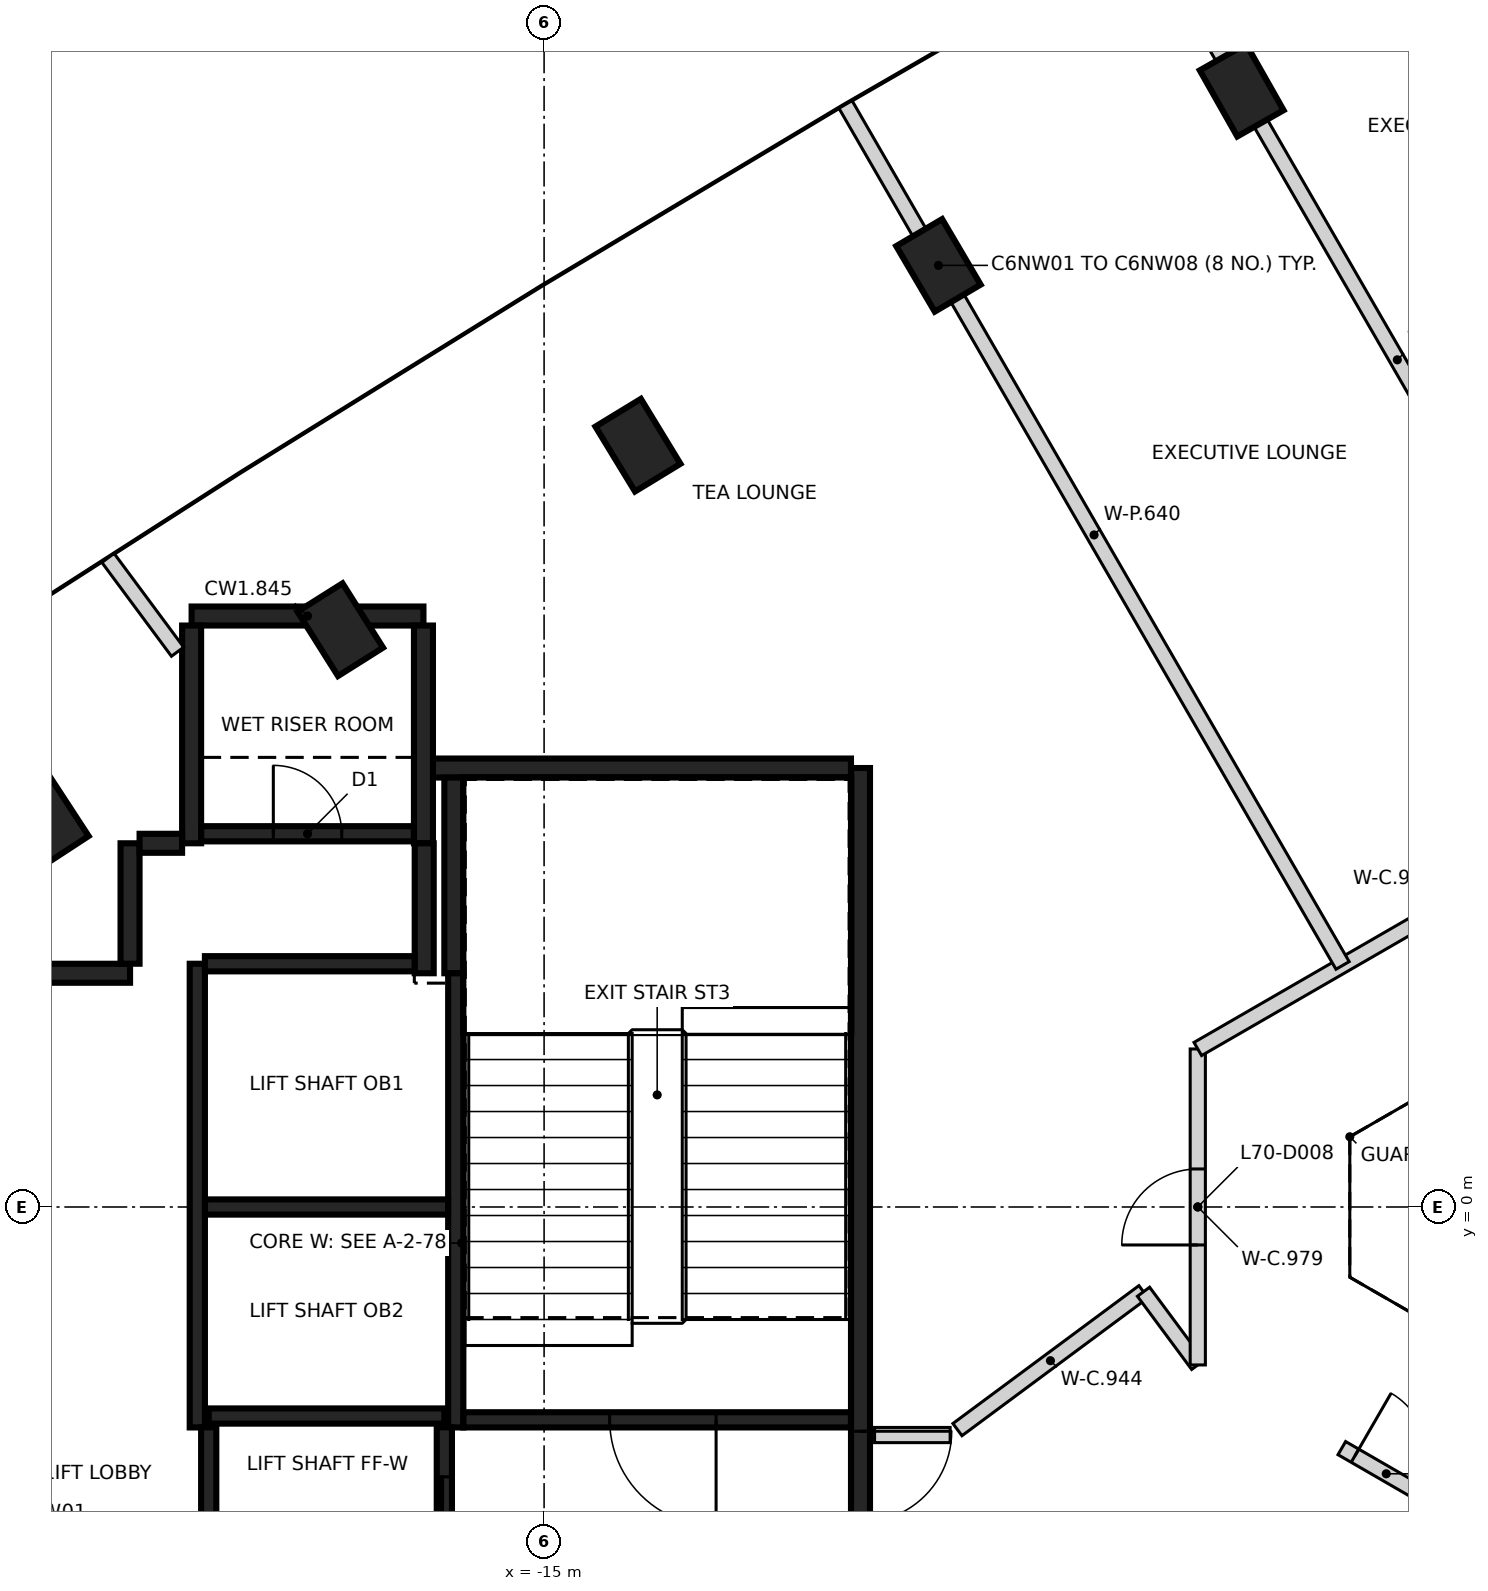
"""IFC4 building model, lengths in metres.
Left out: names, types, materials, properties, quantities, classifications, styles, units other than length and angle.
Written with IfcOpenShell. Run it as: python <this file> out.ifc"""

import sys

from ifc_helpers import new_model, si_unit, direction, frame, frame_2d, origin, origin_2d, place, context, subcontext, project, spatial, rectangle, extrude, element, fill, save


model = new_model("IFC4")
c1 = context("Model", 3, precision=1e-05, world=origin(), true_north=direction((0.0, 1.0)))
c2 = subcontext(c1, "Body", "Model", "MODEL_VIEW")
j1 = project(units=[si_unit("LENGTHUNIT", "METRE"), si_unit("PLANEANGLEUNIT", "RADIAN")], contexts=[c1])
p1 = place(None, origin())
s1 = spatial("IfcSite", under=j1, at=p1, CompositionType="ELEMENT")
p2 = place(p1, origin())
s2 = spatial("IfcBuilding", under=s1, at=p2, CompositionType="ELEMENT")
p3 = place(p2, frame((0.0, 0.0, 276.6)))
s3 = spatial("IfcBuildingStorey", under=s2, at=p3, CompositionType="ELEMENT", Elevation=276.6)
for number, where, z_axis, x_axis in (
    (1, (-5.822, 14.691, -0.35), (0.0, 0.0, 1.0), (-0.493, 0.87, 0.0)),
    (2, (-9.812, 12.388, -0.35), (0.0, 0.0, 1.0), (-0.507, 0.862, 0.0)),
    (3, (-13.765, 10.022, -0.35), (0.0, 0.0, 1.0), (-0.52, 0.854, 0.0)),
    (4, (-17.681, 7.595, -0.35), (0.0, 0.0, 1.0), (-0.533, 0.846, 0.0)),
    (5, (-21.559, 5.107, -0.35), (0.0, 0.0, 1.0), (-0.547, 0.837, 0.0)),
):
    element("IfcColumn", number, at=place(p3, frame(where, z_axis=z_axis, x_axis=x_axis)), inside=s3, PredefinedType="COLUMN", context=c2, shape_type="SweptSolid", body=[
        extrude(rectangle(XDim=1.0, YDim=0.7, at=origin_2d()), origin(), (0.0, 0.0, 1.0), 3.6),
    ])
p4 = place(p3, frame((-10.837, 5.775, 0.0), z_axis=(0.0, 0.0, 1.0), x_axis=(0.0, -1.0, 0.0)))
e6 = element("IfcWall", 6, at=p4, inside=s3, PredefinedType="SHEAR", context=c2, shape_type="SweptSolid", body=[
    extrude(rectangle(XDim=11.55, YDim=0.25, at=frame_2d((5.775, 0.0))), origin(), (0.0, 0.0, 1.0), 3.25),
])
p5 = place(p4, frame((10.025, 0.0, 0.0)))
e7 = element("IfcOpeningElement", 7, at=p5, cuts=e6, PredefinedType="OPENING", context=c2, shape_type="SweptSolid", body=[
    extrude(rectangle(XDim=1.2, YDim=2.1, at=frame_2d((0.6, 1.05))), frame((0.0, 0.135, 0.0), z_axis=(0.0, -1.0, 0.0), x_axis=(1.0, 0.0, 0.0)), (0.0, 0.0, 1.0), 0.27),
])
p6 = place(p4, frame((8.725, 0.0, 0.0)))
e8 = element("IfcOpeningElement", 8, at=p6, cuts=e6, PredefinedType="OPENING", context=c2, shape_type="SweptSolid", body=[
    extrude(rectangle(XDim=1.2, YDim=2.1, at=frame_2d((0.6, 1.05))), frame((0.0, 0.135, 0.0), z_axis=(0.0, -1.0, 0.0), x_axis=(1.0, 0.0, 0.0)), (0.0, 0.0, 1.0), 0.27),
])
p7 = place(p3, frame((-16.472, 5.775, 0.0), z_axis=(0.0, 0.0, 1.0), x_axis=(1.0, 0.0, 0.0)))
e9 = element("IfcWall", 9, at=p7, inside=s3, PredefinedType="SHEAR", context=c2, shape_type="SweptSolid", body=[
    extrude(rectangle(XDim=5.51, YDim=0.25, at=frame_2d((2.755, 0.0))), origin(), (0.0, 0.0, 1.0), 3.25),
])
p8 = place(p3, frame((-19.637, 7.775, 0.0), z_axis=(0.0, 0.0, 1.0), x_axis=(1.0, 0.0, 0.0)))
e10 = element("IfcWall", 10, at=p8, inside=s3, PredefinedType="SHEAR", context=c2, shape_type="SweptSolid", body=[
    extrude(rectangle(XDim=3.05, YDim=0.25, at=frame_2d((1.525, 0.0))), origin(), (0.0, 0.0, 1.0), 3.25),
])
for number, where, z_axis, x_axis in (
    (11, (-16.587, 7.65, 0.0), (0.0, 0.0, 1.0), (0.0, -1.0, 0.0)),
    (12, (-19.637, 4.785, 0.0), (0.0, 0.0, 1.0), (0.0, 1.0, 0.0)),
):
    element("IfcWall", number, at=place(p3, frame(where, z_axis=z_axis, x_axis=x_axis)), inside=s3, PredefinedType="SHEAR", context=c2, shape_type="SweptSolid", body=[
        extrude(rectangle(XDim=2.865, YDim=0.25, at=frame_2d((1.432, 0.0))), origin(), (0.0, 0.0, 1.0), 3.25),
    ])
p9 = place(p3, frame((-16.187, 3.075, 0.0), z_axis=(0.0, 0.0, 1.0), x_axis=(0.0, 1.0, 0.0)))
e13 = element("IfcWall", 13, at=p9, inside=s3, PredefinedType="SHEAR", context=c2, shape_type="SweptSolid", body=[
    extrude(rectangle(XDim=2.575, YDim=0.25, at=frame_2d((1.287, 0.0))), origin(), (0.0, 0.0, 1.0), 3.25),
])
p10 = place(p3, frame((-22.312, 3.075, 0.0), z_axis=(0.0, 0.0, 1.0), x_axis=(1.0, 0.0, 0.0)))
e14 = element("IfcWall", 14, at=p10, inside=s3, PredefinedType="SHEAR", context=c2, shape_type="SweptSolid", body=[
    extrude(rectangle(XDim=1.865, YDim=0.25, at=frame_2d((0.932, 0.0))), origin(), (0.0, 0.0, 1.0), 3.25),
])
p11 = place(p3, frame((-16.577, 4.785, 0.0), z_axis=(0.0, 0.0, 1.0), x_axis=(0.0, -1.0, 0.0)))
e15 = element("IfcWall", 15, at=p11, inside=s3, PredefinedType="SHEAR", context=c2, shape_type="SweptSolid", body=[
    extrude(rectangle(XDim=1.71, YDim=0.25, at=frame_2d((0.855, 0.0))), origin(), (0.0, 0.0, 1.0), 3.25),
])
p12 = place(p3, frame((-20.447, 3.2, 0.0), z_axis=(0.0, 0.0, 1.0), x_axis=(0.0, 1.0, 0.0)))
e16 = element("IfcWall", 16, at=p12, inside=s3, PredefinedType="SHEAR", context=c2, shape_type="SweptSolid", body=[
    extrude(rectangle(XDim=1.584, YDim=0.25, at=frame_2d((0.792, 0.0))), origin(), (0.0, 0.0, 1.0), 3.25),
])
p13 = place(p3, frame((-20.322, 4.785, 0.0), z_axis=(0.0, 0.0, 1.0), x_axis=(1.0, 0.0, 0.0)))
e17 = element("IfcWall", 17, at=p13, inside=s3, PredefinedType="SHEAR", context=c2, shape_type="SweptSolid", body=[
    extrude(rectangle(XDim=0.559, YDim=0.25, at=frame_2d((0.28, 0.0))), origin(), (0.0, 0.0, 1.0), 3.25),
])
p14 = place(p3, frame((-16.162, 3.074, 0.0), z_axis=(0.0, 0.0, 1.0), x_axis=(0.0, -1.0, 0.0)))
e18 = element("IfcWall", 18, at=p14, inside=s3, PredefinedType="SHEAR", context=c2, shape_type="SweptSolid", body=[
    extrude(rectangle(XDim=5.974, YDim=0.2, at=frame_2d((2.987, 0.0))), origin(), (0.0, 0.0, 1.0), 3.25),
])
p15 = place(p3, frame((-19.562, -2.9, 0.0), z_axis=(0.0, 0.0, 1.0), x_axis=(0.0, 1.0, 0.0)))
e19 = element("IfcWall", 19, at=p15, inside=s3, PredefinedType="SHEAR", context=c2, shape_type="SweptSolid", body=[
    extrude(rectangle(XDim=6.1, YDim=0.2, at=frame_2d((3.05, 0.0))), origin(), (0.0, 0.0, 1.0), 3.25),
])
p16 = place(p3, frame((-10.963, -2.8, 0.0), z_axis=(0.0, 0.0, 1.0), x_axis=(-1.0, 0.0, 0.0)))
e20 = element("IfcWall", 20, at=p16, inside=s3, PredefinedType="SHEAR", context=c2, shape_type="SweptSolid", body=[
    extrude(rectangle(XDim=5.098, YDim=0.2, at=frame_2d((2.549, 0.0))), origin(), (0.0, 0.0, 1.0), 3.25),
])
p17 = place(p16, frame((1.774, 0.0, 0.0)))
e21 = element("IfcOpeningElement", 21, at=p17, cuts=e20, PredefinedType="OPENING", context=c2, shape_type="SweptSolid", body=[
    extrude(rectangle(XDim=1.4, YDim=2.1, at=frame_2d((0.7, 1.05))), frame((0.0, 0.11, 0.0), z_axis=(0.0, -1.0, 0.0), x_axis=(1.0, 0.0, 0.0)), (0.0, 0.0, 1.0), 0.22),
])
p18 = place(p3, frame((-16.263, 0.0, 0.0), z_axis=(0.0, 0.0, 1.0), x_axis=(-1.0, 0.0, 0.0)))
e22 = element("IfcWall", 22, at=p18, inside=s3, PredefinedType="SHEAR", context=c2, shape_type="SweptSolid", body=[
    extrude(rectangle(XDim=3.198, YDim=0.2, at=frame_2d((1.599, 0.0))), origin(), (0.0, 0.0, 1.0), 3.25),
])
p19 = place(p3, frame((-19.511, 4.91, 0.0), z_axis=(0.0, 0.0, 1.0), x_axis=(1.0, 0.0, 0.0)))
e23 = element("IfcWall", 23, at=p19, inside=s3, PredefinedType="SHEAR", context=c2, shape_type="SweptSolid", body=[
    extrude(rectangle(XDim=2.798, YDim=0.2, at=frame_2d((1.399, 0.0))), origin(), (0.0, 0.0, 1.0), 3.25),
])
p20 = place(p19, frame((0.949, 0.0, 0.0)))
e24 = element("IfcOpeningElement", 24, at=p20, cuts=e23, PredefinedType="OPENING", context=c2, shape_type="SweptSolid", body=[
    extrude(rectangle(XDim=0.9, YDim=2.1, at=frame_2d((0.45, 1.05))), frame((0.0, 0.11, 0.0), z_axis=(0.0, -1.0, 0.0), x_axis=(1.0, 0.0, 0.0)), (0.0, 0.0, 1.0), 0.22),
])
p21 = place(p3, frame((-19.462, 3.2, 0.0), z_axis=(0.0, 0.0, 1.0), x_axis=(1.0, 0.0, 0.0)))
e25 = element("IfcWall", 25, at=p21, inside=s3, PredefinedType="SHEAR", context=c2, shape_type="SweptSolid", body=[
    extrude(rectangle(XDim=2.759, YDim=0.2, at=frame_2d((1.379, 0.0))), origin(), (0.0, 0.0, 1.0), 3.25),
])
p22 = place(p3, frame((-19.412, -2.75, 0.0), z_axis=(0.0, 0.0, 1.0), x_axis=(1.0, 0.0, 0.0)))
e26 = element("IfcWall", 26, at=p22, inside=s3, PredefinedType="SHEAR", context=c2, shape_type="SweptSolid", body=[
    extrude(rectangle(XDim=3.1, YDim=0.2, at=frame_2d((1.55, 0.0))), origin(), (0.0, 0.0, 1.0), 3.25),
])
p23 = place(p3, frame((-16.312, -2.898, 0.0), z_axis=(0.0, 0.0, 1.0), x_axis=(0.0, -1.0, 0.0)))
e27 = element("IfcWall", 27, at=p23, inside=s3, PredefinedType="SHEAR", context=c2, shape_type="SweptSolid", body=[
    extrude(rectangle(XDim=2.651, YDim=0.2, at=frame_2d((1.325, 0.0))), origin(), (0.0, 0.0, 1.0), 3.25),
])
p24 = place(p23, frame((0.652, 0.0, 0.0)))
e28 = element("IfcOpeningElement", 28, at=p24, cuts=e27, PredefinedType="OPENING", context=c2, shape_type="SweptSolid", body=[
    extrude(rectangle(XDim=1.3, YDim=2.1, at=frame_2d((0.65, 1.05))), frame((0.0, 0.11, 0.0), z_axis=(0.0, -1.0, 0.0), x_axis=(1.0, 0.0, 0.0)), (0.0, 0.0, 1.0), 0.22),
])
p25 = place(p3, frame((-19.412, -5.549, 0.0), z_axis=(0.0, 0.0, 1.0), x_axis=(0.0, 1.0, 0.0)))
e29 = element("IfcWall", 29, at=p25, inside=s3, PredefinedType="SHEAR", context=c2, shape_type="SweptSolid", body=[
    extrude(rectangle(XDim=2.651, YDim=0.2, at=frame_2d((1.325, 0.0))), origin(), (0.0, 0.0, 1.0), 3.25),
])
p26 = place(p3, frame((-10.652, -3.0, 0.0), z_axis=(0.0, 0.0, 1.0), x_axis=(1.0, 0.0, 0.0)))
e30 = element("IfcWall", 30, at=p26, inside=s3, PredefinedType="PARTITIONING", context=c2, shape_type="SweptSolid", body=[
    extrude(rectangle(XDim=0.994, YDim=0.2, at=frame_2d((0.497, 0.0))), origin(), (0.0, 0.0, 1.0), 3.25),
])
p27 = place(p3, frame((-7.115, -1.115, 0.0), z_axis=(0.0, 0.0, 1.0), x_axis=(-0.803344165632, -0.595515030495, 0.0)))
e31 = element("IfcWall", 31, at=p27, inside=s3, PredefinedType="PARTITIONING", context=c2, shape_type="SweptSolid", body=[
    extrude(rectangle(XDim=3.046, YDim=0.2, at=frame_2d((1.523, 0.0))), origin(), (0.0, 0.0, 1.0), 3.25),
])
p28 = place(p3, frame((-7.114, -1.115, 0.0), z_axis=(0.0, 0.0, 1.0), x_axis=(0.595690139668, -0.803214328496, 0.0)))
e32 = element("IfcWall", 32, at=p28, inside=s3, PredefinedType="PARTITIONING", context=c2, shape_type="SweptSolid", body=[
    extrude(rectangle(XDim=1.199, YDim=0.2, at=frame_2d((0.599, 0.0))), origin(), (0.0, 0.0, 1.0), 3.25),
])
p29 = place(p3, frame((-6.4, -2.078, 0.0), z_axis=(0.0, 0.0, 1.0), x_axis=(0.0, 1.0, 0.0)))
e33 = element("IfcWall", 33, at=p29, inside=s3, PredefinedType="PARTITIONING", context=c2, shape_type="SweptSolid", body=[
    extrude(rectangle(XDim=4.157, YDim=0.2, at=frame_2d((2.079, 0.0))), origin(), (0.0, 0.0, 1.0), 3.25),
])
p30 = place(p29, frame((1.579, 0.0, 0.0)))
e34 = element("IfcOpeningElement", 34, at=p30, cuts=e33, PredefinedType="OPENING", context=c2, shape_type="SweptSolid", body=[
    extrude(rectangle(XDim=1.0, YDim=2.1, at=frame_2d((0.5, 1.05))), frame((0.0, 0.11, 0.0), z_axis=(0.0, -1.0, 0.0), x_axis=(1.0, 0.0, 0.0)), (0.0, 0.0, 1.0), 0.22),
])
p31 = place(p3, frame((-6.4, 2.079, 0.0), z_axis=(0.0, 0.0, 1.0), x_axis=(0.866044821263, 0.499966366432, 0.0)))
e35 = element("IfcWall", 35, at=p31, inside=s3, PredefinedType="PARTITIONING", context=c2, shape_type="SweptSolid", body=[
    extrude(rectangle(XDim=8.953, YDim=0.2, at=frame_2d((4.477, 0.0))), origin(), (0.0, 0.0, 1.0), 3.25),
])
p32 = place(p31, frame((4.003, 0.0, 0.0)))
e36 = element("IfcOpeningElement", 36, at=p32, cuts=e35, PredefinedType="OPENING", context=c2, shape_type="SweptSolid", body=[
    extrude(rectangle(XDim=1.0, YDim=2.1, at=frame_2d((0.5, 1.05))), frame((0.0, 0.11, 0.0), z_axis=(0.0, -1.0, 0.0), x_axis=(1.0, 0.0, 0.0)), (0.0, 0.0, 1.0), 0.22),
])
p33 = place(p3, frame((-4.505, -3.172, 0.0), z_axis=(0.0, 0.0, 1.0), x_axis=(0.865815783666, -0.500362897061, 0.0)))
e37 = element("IfcWall", 37, at=p33, inside=s3, PredefinedType="PARTITIONING", context=c2, shape_type="SweptSolid", body=[
    extrude(rectangle(XDim=6.819, YDim=0.2, at=frame_2d((3.409, 0.0))), origin(), (0.0, 0.0, 1.0), 3.25),
])
p34 = place(p33, frame((0.2, 0.0, 0.0)))
e38 = element("IfcOpeningElement", 38, at=p34, cuts=e37, PredefinedType="OPENING", context=c2, shape_type="SweptSolid", body=[
    extrude(rectangle(XDim=0.95, YDim=2.1, at=frame_2d((0.475, 1.05))), frame((0.0, 0.11, 0.0), z_axis=(0.0, -1.0, 0.0), x_axis=(1.0, 0.0, 0.0)), (0.0, 0.0, 1.0), 0.22),
])
p35 = place(p3, frame((-20.738, 8.539, 0.0), z_axis=(0.0, 0.0, 1.0), x_axis=(0.595694844153, -0.803210839475, 0.0)))
e39 = element("IfcWall", 39, at=p35, inside=s3, PredefinedType="PARTITIONING", context=c2, shape_type="SweptSolid", body=[
    extrude(rectangle(XDim=1.536, YDim=0.2, at=frame_2d((0.768, 0.0))), origin(), (0.0, 0.0, 1.0), 3.25),
])
p36 = place(p3, frame((-11.035, 14.505, 0.0), z_axis=(0.0, 0.0, 1.0), x_axis=(0.499989597041, -0.866031409852, 0.0)))
e40 = element("IfcWall", 40, at=p36, inside=s3, PredefinedType="PARTITIONING", context=c2, shape_type="SweptSolid", body=[
    extrude(rectangle(XDim=13.079, YDim=0.2, at=frame_2d((6.54, 0.0))), origin(), (0.0, 0.0, 1.0), 3.25),
])
p37 = place(p3, frame((-7.044, 16.809, 0.0), z_axis=(0.0, 0.0, 1.0), x_axis=(0.499997679687, -0.866026743414, 0.0)))
e41 = element("IfcWall", 41, at=p37, inside=s3, PredefinedType="PARTITIONING", context=c2, shape_type="SweptSolid", body=[
    extrude(rectangle(XDim=13.079, YDim=0.2, at=frame_2d((6.54, 0.0))), origin(), (0.0, 0.0, 1.0), 3.25),
])
p38 = place(p3, frame((-4.303, -6.06, 0.0), z_axis=(0.0, 0.0, 1.0), x_axis=(0.500045362686, 0.865999212041, 0.0)))
e42 = element("IfcWall", 42, at=p38, inside=s3, PredefinedType="PARTITIONING", context=c2, shape_type="SweptSolid", body=[
    extrude(rectangle(XDim=2.4, YDim=0.15, at=frame_2d((1.2, 0.0))), origin(), (0.0, 0.0, 1.0), 3.25),
])
p39 = place(p38, frame((0.8, 0.0, 0.0)))
e43 = element("IfcOpeningElement", 43, at=p39, cuts=e42, PredefinedType="OPENING", context=c2, shape_type="SweptSolid", body=[
    extrude(rectangle(XDim=0.8, YDim=2.1, at=frame_2d((0.4, 1.05))), frame((0.0, 0.085, 0.0), z_axis=(0.0, -1.0, 0.0), x_axis=(1.0, 0.0, 0.0)), (0.0, 0.0, 1.0), 0.17),
])
p40 = place(p24, origin())
e44 = element("IfcDoor", 44, at=p40, inside=s3, OperationType="SLIDING_TO_RIGHT", PredefinedType="DOOR", context=c2, shape_type="SweptSolid", body=[
    extrude(rectangle(XDim=1.3, YDim=2.1, at=frame_2d((0.65, 1.05))), frame((0.0, 0.025, 0.0), z_axis=(0.0, -1.0, 0.0), x_axis=(1.0, 0.0, 0.0)), (0.0, 0.0, 1.0), 0.05),
])
fill(e28, e44)
p41 = place(p6, origin())
e45 = element("IfcDoor", 45, at=p41, inside=s3, OperationType="SINGLE_SWING_RIGHT", PredefinedType="DOOR", context=c2, shape_type="SweptSolid", body=[
    extrude(rectangle(XDim=1.2, YDim=2.1, at=frame_2d((0.6, 1.05))), frame((0.0, 0.025, 0.0), z_axis=(0.0, -1.0, 0.0), x_axis=(1.0, 0.0, 0.0)), (0.0, 0.0, 1.0), 0.05),
])
fill(e8, e45)
p42 = place(p17, origin())
e46 = element("IfcDoor", 46, at=p42, inside=s3, OperationType="SINGLE_SWING_RIGHT", PredefinedType="DOOR", context=c2, shape_type="SweptSolid", body=[
    extrude(rectangle(XDim=1.4, YDim=2.1, at=frame_2d((0.7, 1.05))), frame((0.0, 0.025, 0.0), z_axis=(0.0, -1.0, 0.0), x_axis=(1.0, 0.0, 0.0)), (0.0, 0.0, 1.0), 0.05),
])
fill(e21, e46)
p43 = place(p20, origin())
e47 = element("IfcDoor", 47, at=p43, inside=s3, OperationType="SINGLE_SWING_LEFT", PredefinedType="DOOR", context=c2, shape_type="SweptSolid", body=[
    extrude(rectangle(XDim=0.9, YDim=2.1, at=frame_2d((0.45, 1.05))), frame((0.0, 0.025, 0.0), z_axis=(0.0, -1.0, 0.0), x_axis=(1.0, 0.0, 0.0)), (0.0, 0.0, 1.0), 0.05),
])
fill(e24, e47)
p44 = place(p30, origin())
e48 = element("IfcDoor", 48, at=p44, inside=s3, OperationType="SINGLE_SWING_LEFT", PredefinedType="DOOR", context=c2, shape_type="SweptSolid", body=[
    extrude(rectangle(XDim=1.0, YDim=2.1, at=frame_2d((0.5, 1.05))), frame((0.0, 0.025, 0.0), z_axis=(0.0, -1.0, 0.0), x_axis=(1.0, 0.0, 0.0)), (0.0, 0.0, 1.0), 0.05),
])
fill(e34, e48)
p45 = place(p34, frame((0.95, 0.0, 0.0), z_axis=(0.0, 0.0, 1.0), x_axis=(-1.0, 0.0, 0.0)))
e49 = element("IfcDoor", 49, at=p45, inside=s3, OperationType="SINGLE_SWING_LEFT", PredefinedType="DOOR", context=c2, shape_type="SweptSolid", body=[
    extrude(rectangle(XDim=0.95, YDim=2.1, at=frame_2d((0.475, 1.05))), frame((0.0, 0.025, 0.0), z_axis=(0.0, -1.0, 0.0), x_axis=(1.0, 0.0, 0.0)), (0.0, 0.0, 1.0), 0.05),
])
fill(e38, e49)
save(model, sys.argv[1])
